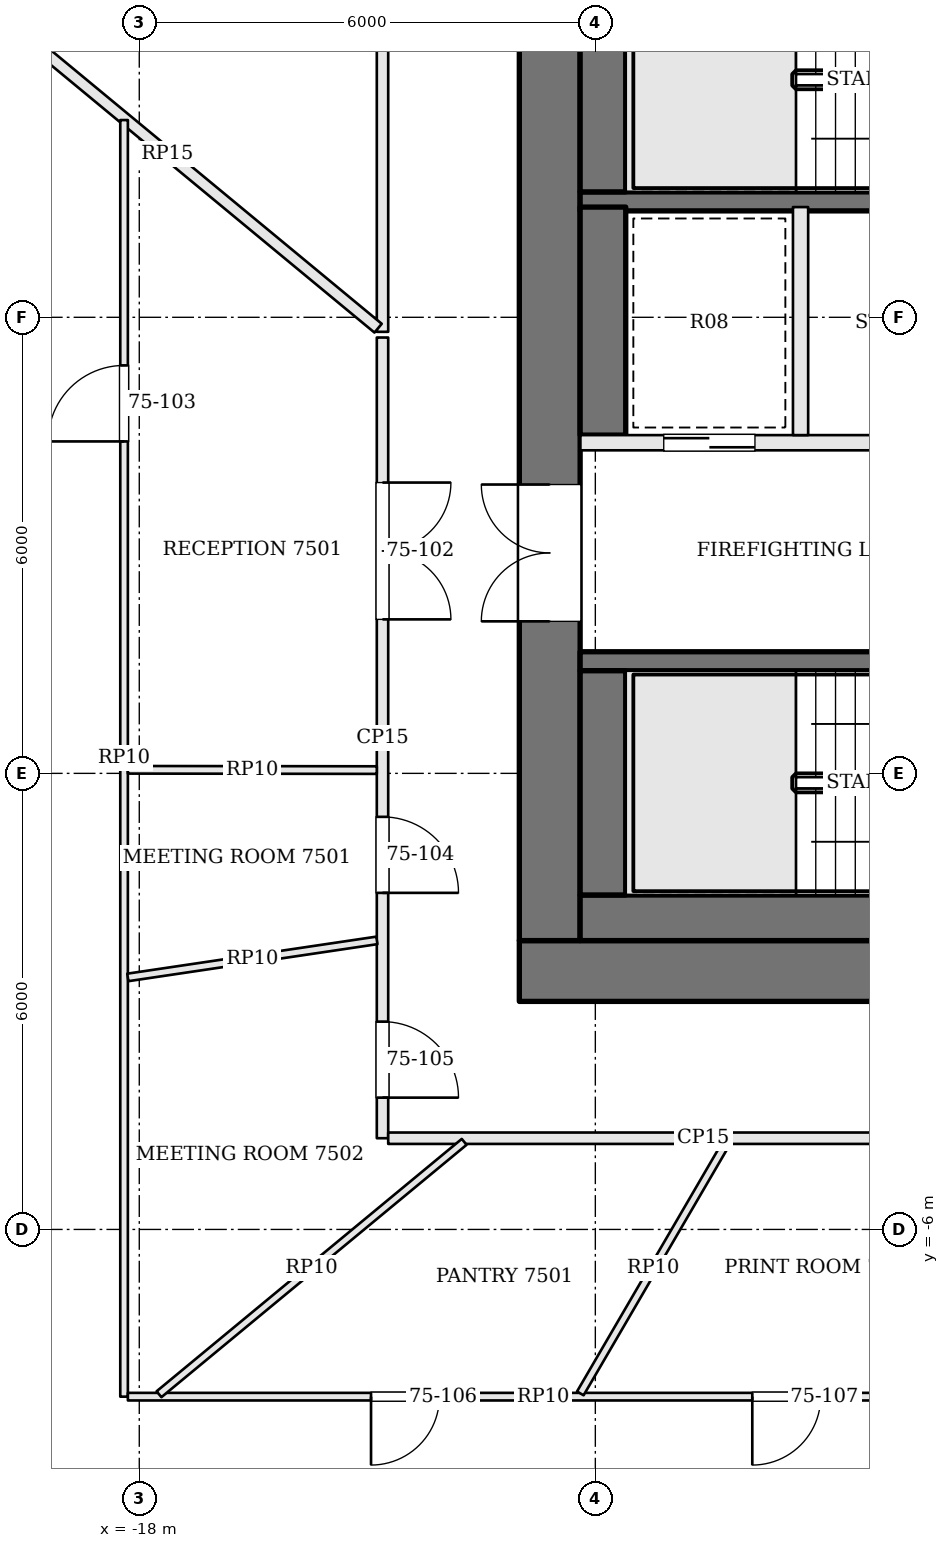
"""IFC4 building model, lengths in metres.
Left out: names, types, materials, properties, quantities, classifications, styles, units other than length and angle.
Written with IfcOpenShell. Run it as: python <this file> out.ifc"""

import sys

from ifc_helpers import new_model, si_unit, direction, frame, frame_2d, origin, place, context, subcontext, project, spatial, rectangle, extrude, element, fill, save


model = new_model("IFC4")
c1 = context("Model", 3, precision=1e-05, world=origin(), true_north=direction((0.0, 1.0)))
c2 = subcontext(c1, "Body", "Model", "MODEL_VIEW")
j1 = project(units=[si_unit("LENGTHUNIT", "METRE"), si_unit("PLANEANGLEUNIT", "RADIAN")], contexts=[c1])
p1 = place(None, origin())
s1 = spatial("IfcSite", under=j1, at=p1, CompositionType="ELEMENT")
p2 = place(p1, origin())
s2 = spatial("IfcBuilding", under=s1, at=p2, CompositionType="ELEMENT")
p3 = place(p2, frame((0.0, 0.0, 303.9)))
s3 = spatial("IfcBuildingStorey", under=s2, at=p3, CompositionType="ELEMENT", Elevation=303.9)
p4 = place(p3, frame((-13.0, -2.6, 0.0), z_axis=(0.0, 0.0, 1.0), x_axis=(1.0, 0.0, 0.0)))
e1 = element("IfcWall", 1, at=p4, inside=s3, PredefinedType="SHEAR", context=c2, shape_type="SweptSolid", body=[
    extrude(rectangle(XDim=26.0, YDim=0.8, at=frame_2d((13.0, 0.0))), origin(), (0.0, 0.0, 1.0), 3.9),
])
p5 = place(p4, frame((9.275, 0.0, 0.0)))
e2 = element("IfcOpeningElement", 2, at=p5, cuts=e1, PredefinedType="OPENING", context=c2, shape_type="SweptSolid", body=[
    extrude(rectangle(XDim=0.9, YDim=2.1, at=frame_2d((0.45, 1.05))), frame((0.0, 0.41, 0.0), z_axis=(0.0, -1.0, 0.0), x_axis=(1.0, 0.0, 0.0)), (0.0, 0.0, 1.0), 0.82),
])
p6 = place(p4, frame((11.75, 0.0, 0.0)))
e3 = element("IfcOpeningElement", 3, at=p6, cuts=e1, PredefinedType="OPENING", context=c2, shape_type="SweptSolid", body=[
    extrude(rectangle(XDim=1.0, YDim=2.1, at=frame_2d((0.5, 1.05))), frame((0.0, 0.41, 0.0), z_axis=(0.0, -1.0, 0.0), x_axis=(1.0, 0.0, 0.0)), (0.0, 0.0, 1.0), 0.82),
])
p7 = place(p4, frame((14.325, 0.0, 0.0)))
e4 = element("IfcOpeningElement", 4, at=p7, cuts=e1, PredefinedType="OPENING", context=c2, shape_type="SweptSolid", body=[
    extrude(rectangle(XDim=0.9, YDim=2.1, at=frame_2d((0.45, 1.05))), frame((0.0, 0.41, 0.0), z_axis=(0.0, -1.0, 0.0), x_axis=(1.0, 0.0, 0.0)), (0.0, 0.0, 1.0), 0.82),
])
p8 = place(p4, frame((16.7, 0.0, 0.0)))
e5 = element("IfcOpeningElement", 5, at=p8, cuts=e1, PredefinedType="OPENING", context=c2, shape_type="SweptSolid", body=[
    extrude(rectangle(XDim=0.9, YDim=2.1, at=frame_2d((0.45, 1.05))), frame((0.0, 0.41, 0.0), z_axis=(0.0, -1.0, 0.0), x_axis=(1.0, 0.0, 0.0)), (0.0, 0.0, 1.0), 0.82),
])
p9 = place(p3, frame((-12.6, -2.2, 0.0), z_axis=(0.0, 0.0, 1.0), x_axis=(0.0, 1.0, 0.0)))
e6 = element("IfcWall", 6, at=p9, inside=s3, PredefinedType="SHEAR", context=c2, shape_type="SweptSolid", body=[
    extrude(rectangle(XDim=13.4, YDim=0.8, at=frame_2d((6.7, 0.0))), origin(), (0.0, 0.0, 1.0), 3.9),
])
p10 = place(p9, frame((4.2, 0.0, 0.0)))
e7 = element("IfcOpeningElement", 7, at=p10, cuts=e6, PredefinedType="OPENING", context=c2, shape_type="SweptSolid", body=[
    extrude(rectangle(XDim=1.8, YDim=2.1, at=frame_2d((0.9, 1.05))), frame((0.0, 0.41, 0.0), z_axis=(0.0, -1.0, 0.0), x_axis=(1.0, 0.0, 0.0)), (0.0, 0.0, 1.0), 0.82),
])
p11 = place(p3, frame((-12.2, 1.475, 0.0), z_axis=(0.0, 0.0, 1.0), x_axis=(1.0, 0.0, 0.0)))
e8 = element("IfcWall", 8, at=p11, inside=s3, PredefinedType="SOLIDWALL", context=c2, shape_type="SweptSolid", body=[
    extrude(rectangle(XDim=7.1, YDim=0.25, at=frame_2d((3.55, 0.0))), origin(), (0.0, 0.0, 1.0), 3.7),
])
p12 = place(p11, frame((5.8, 0.0, 0.0)))
e9 = element("IfcOpeningElement", 9, at=p12, cuts=e8, PredefinedType="OPENING", context=c2, shape_type="SweptSolid", body=[
    extrude(rectangle(XDim=1.2, YDim=2.1, at=frame_2d((0.6, 1.05))), frame((0.0, 0.135, 0.0), z_axis=(0.0, -1.0, 0.0), x_axis=(1.0, 0.0, 0.0)), (0.0, 0.0, 1.0), 0.27),
])
p13 = place(p3, frame((-12.2, 4.35, 0.0), z_axis=(0.0, 0.0, 1.0), x_axis=(1.0, 0.0, 0.0)))
e10 = element("IfcWall", 10, at=p13, inside=s3, PredefinedType="SOLIDWALL", context=c2, shape_type="SweptSolid", body=[
    extrude(rectangle(XDim=7.1, YDim=0.2, at=frame_2d((3.55, 0.0))), origin(), (0.0, 0.0, 1.0), 3.7),
])
p14 = place(p13, frame((4.4, 0.0, 0.0)))
e11 = element("IfcOpeningElement", 11, at=p14, cuts=e10, PredefinedType="OPENING", context=c2, shape_type="SweptSolid", body=[
    extrude(rectangle(XDim=1.2, YDim=2.1, at=frame_2d((0.6, 1.05))), frame((0.0, 0.11, 0.0), z_axis=(0.0, -1.0, 0.0), x_axis=(1.0, 0.0, 0.0)), (0.0, 0.0, 1.0), 0.22),
])
p15 = place(p13, frame((1.1, 0.0, 0.0)))
e12 = element("IfcOpeningElement", 12, at=p15, cuts=e10, PredefinedType="OPENING", context=c2, shape_type="SweptSolid", body=[
    extrude(rectangle(XDim=1.2, YDim=2.1, at=frame_2d((0.6, 1.05))), frame((0.0, 0.11, 0.0), z_axis=(0.0, -1.0, 0.0), x_axis=(1.0, 0.0, 0.0)), (0.0, 0.0, 1.0), 0.22),
])
p16 = place(p3, frame((-12.2, 7.525, 0.0), z_axis=(0.0, 0.0, 1.0), x_axis=(1.0, 0.0, 0.0)))
e13 = element("IfcWall", 13, at=p16, inside=s3, PredefinedType="SOLIDWALL", context=c2, shape_type="SweptSolid", body=[
    extrude(rectangle(XDim=7.1, YDim=0.25, at=frame_2d((3.55, 0.0))), origin(), (0.0, 0.0, 1.0), 3.7),
])
p17 = place(p16, frame((5.8, 0.0, 0.0)))
e14 = element("IfcOpeningElement", 14, at=p17, cuts=e13, PredefinedType="OPENING", context=c2, shape_type="SweptSolid", body=[
    extrude(rectangle(XDim=1.2, YDim=2.1, at=frame_2d((0.6, 1.05))), frame((0.0, 0.135, 0.0), z_axis=(0.0, -1.0, 0.0), x_axis=(1.0, 0.0, 0.0)), (0.0, 0.0, 1.0), 0.27),
])
p18 = place(p3, frame((-9.3, 4.45, 0.0), z_axis=(0.0, 0.0, 1.0), x_axis=(0.0, 1.0, 0.0)))
e15 = element("IfcWall", 15, at=p18, inside=s3, PredefinedType="SOLIDWALL", context=c2, shape_type="SweptSolid", body=[
    extrude(rectangle(XDim=3.0, YDim=0.2, at=frame_2d((1.5, 0.0))), origin(), (0.0, 0.0, 1.0), 3.7),
])
p19 = place(p3, frame((-12.2, -1.9, 0.0), z_axis=(0.0, 0.0, 1.0), x_axis=(1.0, 0.0, 0.0)))
e16 = element("IfcWall", 16, at=p19, inside=s3, PredefinedType="SOLIDWALL", context=c2, shape_type="SweptSolid", body=[
    extrude(rectangle(XDim=7.1, YDim=0.6, at=frame_2d((3.55, 0.0))), origin(), (0.0, 0.0, 1.0), 3.7),
])
p20 = place(p3, frame((-11.9, -1.6, 0.0), z_axis=(0.0, 0.0, 1.0), x_axis=(0.0, 1.0, 0.0)))
e17 = element("IfcWall", 17, at=p20, inside=s3, PredefinedType="SOLIDWALL", context=c2, shape_type="SweptSolid", body=[
    extrude(rectangle(XDim=2.95, YDim=0.6, at=frame_2d((1.475, 0.0))), origin(), (0.0, 0.0, 1.0), 3.7),
])
p21 = place(p3, frame((-11.9, 4.45, 0.0), z_axis=(0.0, 0.0, 1.0), x_axis=(0.0, 1.0, 0.0)))
e18 = element("IfcWall", 18, at=p21, inside=s3, PredefinedType="SOLIDWALL", context=c2, shape_type="SweptSolid", body=[
    extrude(rectangle(XDim=3.0, YDim=0.6, at=frame_2d((1.5, 0.0))), origin(), (0.0, 0.0, 1.0), 3.7),
])
p22 = place(p3, frame((-11.9, 7.65, 0.0), z_axis=(0.0, 0.0, 1.0), x_axis=(0.0, 1.0, 0.0)))
e19 = element("IfcWall", 19, at=p22, inside=s3, PredefinedType="SOLIDWALL", context=c2, shape_type="SweptSolid", body=[
    extrude(rectangle(XDim=2.95, YDim=0.6, at=frame_2d((1.475, 0.0))), origin(), (0.0, 0.0, 1.0), 3.7),
])
p23 = place(p3, frame((-14.8, 13.725, 0.0), z_axis=(0.0, 0.0, 1.0), x_axis=(0.0, -1.0, 0.0)))
e20 = element("IfcWall", 20, at=p23, inside=s3, PredefinedType="PARTITIONING", context=c2, shape_type="SweptSolid", body=[
    extrude(rectangle(XDim=7.916, YDim=0.15, at=frame_2d((3.958, 0.0))), origin(), (0.0, 0.0, 1.0), 3.198),
])
p24 = place(p3, frame((-20.403, 10.442, 0.0), z_axis=(0.0, 0.0, 1.0), x_axis=(0.770599445655, -0.637319774019, 0.0)))
e21 = element("IfcWall", 21, at=p24, inside=s3, PredefinedType="PARTITIONING", context=c2, shape_type="SweptSolid", body=[
    extrude(rectangle(XDim=7.195, YDim=0.15, at=frame_2d((3.598, 0.0))), origin(), (0.0, 0.0, 1.0), 2.78),
])
p25 = place(p3, frame((-14.8, 5.734, 0.0), z_axis=(0.0, 0.0, 1.0), x_axis=(0.0, -1.0, 0.0)))
e22 = element("IfcWall", 22, at=p25, inside=s3, PredefinedType="PARTITIONING", context=c2, shape_type="SweptSolid", body=[
    extrude(rectangle(XDim=10.534, YDim=0.15, at=frame_2d((5.267, 0.0))), origin(), (0.0, 0.0, 1.0), 3.198),
])
p26 = place(p25, frame((1.908, 0.0, 0.0)))
e23 = element("IfcOpeningElement", 23, at=p26, cuts=e22, PredefinedType="OPENING", context=c2, shape_type="SweptSolid", body=[
    extrude(rectangle(XDim=1.8, YDim=2.1, at=frame_2d((0.9, 1.05))), frame((0.0, 0.085, 0.0), z_axis=(0.0, -1.0, 0.0), x_axis=(1.0, 0.0, 0.0)), (0.0, 0.0, 1.0), 0.17),
])
p27 = place(p25, frame((6.306, 0.0, 0.0)))
e24 = element("IfcOpeningElement", 24, at=p27, cuts=e22, PredefinedType="OPENING", context=c2, shape_type="SweptSolid", body=[
    extrude(rectangle(XDim=1.0, YDim=2.4, at=frame_2d((0.5, 1.2))), frame((0.0, 0.085, 0.0), z_axis=(0.0, -1.0, 0.0), x_axis=(1.0, 0.0, 0.0)), (0.0, 0.0, 1.0), 0.17),
])
p28 = place(p25, frame((9.0, 0.0, 0.0)))
e25 = element("IfcOpeningElement", 25, at=p28, cuts=e22, PredefinedType="OPENING", context=c2, shape_type="SweptSolid", body=[
    extrude(rectangle(XDim=1.0, YDim=2.4, at=frame_2d((0.5, 1.2))), frame((0.0, 0.085, 0.0), z_axis=(0.0, -1.0, 0.0), x_axis=(1.0, 0.0, 0.0)), (0.0, 0.0, 1.0), 0.17),
])
p29 = place(p3, frame((-14.725, -4.8, 0.0), z_axis=(0.0, 0.0, 1.0), x_axis=(1.0, 0.0, 0.0)))
e26 = element("IfcWall", 26, at=p29, inside=s3, PredefinedType="PARTITIONING", context=c2, shape_type="SweptSolid", body=[
    extrude(rectangle(XDim=8.288, YDim=0.15, at=frame_2d((4.144, 0.0))), origin(), (0.0, 0.0, 1.0), 3.198),
])
p30 = place(p3, frame((-9.286, -17.485, 0.0), z_axis=(0.0, 0.0, 1.0), x_axis=(0.219187693593, 0.975682712247, 0.0)))
e27 = element("IfcWall", 27, at=p30, inside=s3, PredefinedType="PARTITIONING", context=c2, shape_type="SweptSolid", body=[
    extrude(rectangle(XDim=12.926, YDim=0.15, at=frame_2d((6.463, 0.0))), origin(), (0.0, 0.0, 1.0), 2.78),
])
p31 = place(p3, frame((-18.2, -8.2, 0.0), z_axis=(0.0, 0.0, 1.0), x_axis=(0.0, 1.0, 0.0)))
e28 = element("IfcWall", 28, at=p31, inside=s3, PredefinedType="PARTITIONING", context=c2, shape_type="SweptSolid", body=[
    extrude(rectangle(XDim=16.795, YDim=0.1, at=frame_2d((8.397, 0.0))), origin(), (0.0, 0.0, 1.0), 3.198),
])
p32 = place(p31, frame((12.567, 0.0, 0.0)))
e29 = element("IfcOpeningElement", 29, at=p32, cuts=e28, PredefinedType="OPENING", context=c2, shape_type="SweptSolid", body=[
    extrude(rectangle(XDim=1.0, YDim=2.1, at=frame_2d((0.5, 1.05))), frame((0.0, 0.06, 0.0), z_axis=(0.0, -1.0, 0.0), x_axis=(1.0, 0.0, 0.0)), (0.0, 0.0, 1.0), 0.12),
])
p33 = place(p3, frame((-7.221, -8.2, 0.0), z_axis=(0.0, 0.0, 1.0), x_axis=(-1.0, 0.0, 0.0)))
e30 = element("IfcWall", 30, at=p33, inside=s3, PredefinedType="PARTITIONING", context=c2, shape_type="SweptSolid", body=[
    extrude(rectangle(XDim=10.929, YDim=0.1, at=frame_2d((5.464, 0.0))), origin(), (0.0, 0.0, 1.0), 3.198),
])
p34 = place(p33, frame((6.83, 0.0, 0.0)))
e31 = element("IfcOpeningElement", 31, at=p34, cuts=e30, PredefinedType="OPENING", context=c2, shape_type="SweptSolid", body=[
    extrude(rectangle(XDim=0.9, YDim=2.1, at=frame_2d((0.45, 1.05))), frame((0.0, 0.06, 0.0), z_axis=(0.0, -1.0, 0.0), x_axis=(1.0, 0.0, 0.0)), (0.0, 0.0, 1.0), 0.12),
])
p35 = place(p33, frame((1.814, 0.0, 0.0)))
e32 = element("IfcOpeningElement", 32, at=p35, cuts=e30, PredefinedType="OPENING", context=c2, shape_type="SweptSolid", body=[
    extrude(rectangle(XDim=0.9, YDim=2.1, at=frame_2d((0.45, 1.05))), frame((0.0, 0.06, 0.0), z_axis=(0.0, -1.0, 0.0), x_axis=(1.0, 0.0, 0.0)), (0.0, 0.0, 1.0), 0.12),
])
p36 = place(p3, frame((-14.875, 0.043, 0.0), z_axis=(0.0, 0.0, 1.0), x_axis=(-0.999999288634, 0.00119278281, 0.0)))
e33 = element("IfcWall", 33, at=p36, inside=s3, PredefinedType="PARTITIONING", context=c2, shape_type="SweptSolid", body=[
    extrude(rectangle(XDim=3.275, YDim=0.1, at=frame_2d((1.637, 0.0))), origin(), (0.0, 0.0, 1.0), 3.198),
])
p37 = place(p3, frame((-14.874, -2.198, 0.0), z_axis=(0.0, 0.0, 1.0), x_axis=(-0.989128534105, -0.147053537934, 0.0)))
e34 = element("IfcWall", 34, at=p37, inside=s3, PredefinedType="PARTITIONING", context=c2, shape_type="SweptSolid", body=[
    extrude(rectangle(XDim=3.312, YDim=0.1, at=frame_2d((1.656, 0.0))), origin(), (0.0, 0.0, 1.0), 3.198),
])
p38 = place(p3, frame((-13.726, -4.848, 0.0), z_axis=(0.0, 0.0, 1.0), x_axis=(-0.770616504922, -0.637299146667, 0.0)))
e35 = element("IfcWall", 35, at=p38, inside=s3, PredefinedType="PARTITIONING", context=c2, shape_type="SweptSolid", body=[
    extrude(rectangle(XDim=5.21, YDim=0.1, at=frame_2d((2.605, 0.0))), origin(), (0.0, 0.0, 1.0), 3.198),
])
p39 = place(p3, frame((-10.278, -4.865, 0.0), z_axis=(0.0, 0.0, 1.0), x_axis=(-0.503743553808, -0.863853246794, 0.0)))
e36 = element("IfcWall", 36, at=p39, inside=s3, PredefinedType="PARTITIONING", context=c2, shape_type="SweptSolid", body=[
    extrude(rectangle(XDim=3.811, YDim=0.1, at=frame_2d((1.905, 0.0))), origin(), (0.0, 0.0, 1.0), 3.198),
])
p40 = place(p10, origin())
e37 = element("IfcDoor", 37, at=p40, inside=s3, OperationType="DOUBLE_DOOR_SINGLE_SWING", PredefinedType="DOOR", context=c2, shape_type="SweptSolid", body=[
    extrude(rectangle(XDim=1.8, YDim=2.1, at=frame_2d((0.9, 1.05))), frame((0.0, 0.025, 0.0), z_axis=(0.0, -1.0, 0.0), x_axis=(1.0, 0.0, 0.0)), (0.0, 0.0, 1.0), 0.05),
])
fill(e7, e37)
p41 = place(p15, origin())
e38 = element("IfcDoor", 38, at=p41, inside=s3, OperationType="SLIDING_TO_RIGHT", PredefinedType="DOOR", context=c2, shape_type="SweptSolid", body=[
    extrude(rectangle(XDim=1.2, YDim=2.1, at=frame_2d((0.6, 1.05))), frame((0.0, 0.025, 0.0), z_axis=(0.0, -1.0, 0.0), x_axis=(1.0, 0.0, 0.0)), (0.0, 0.0, 1.0), 0.05),
])
fill(e12, e38)
p42 = place(p26, origin())
e39 = element("IfcDoor", 39, at=p42, inside=s3, OperationType="DOUBLE_DOOR_SINGLE_SWING", PredefinedType="DOOR", context=c2, shape_type="SweptSolid", body=[
    extrude(rectangle(XDim=1.8, YDim=2.1, at=frame_2d((0.9, 1.05))), frame((0.0, 0.025, 0.0), z_axis=(0.0, -1.0, 0.0), x_axis=(1.0, 0.0, 0.0)), (0.0, 0.0, 1.0), 0.05),
])
fill(e23, e39)
p43 = place(p32, origin())
e40 = element("IfcDoor", 40, at=p43, inside=s3, OperationType="SINGLE_SWING_LEFT", PredefinedType="DOOR", context=c2, shape_type="SweptSolid", body=[
    extrude(rectangle(XDim=1.0, YDim=2.1, at=frame_2d((0.5, 1.05))), frame((0.0, 0.025, 0.0), z_axis=(0.0, -1.0, 0.0), x_axis=(1.0, 0.0, 0.0)), (0.0, 0.0, 1.0), 0.05),
])
fill(e29, e40)
p44 = place(p27, origin())
e41 = element("IfcDoor", 41, at=p44, inside=s3, OperationType="SINGLE_SWING_RIGHT", PredefinedType="DOOR", context=c2, shape_type="SweptSolid", body=[
    extrude(rectangle(XDim=1.0, YDim=2.4, at=frame_2d((0.5, 1.2))), frame((0.0, 0.025, 0.0), z_axis=(0.0, -1.0, 0.0), x_axis=(1.0, 0.0, 0.0)), (0.0, 0.0, 1.0), 0.05),
])
fill(e24, e41)
p45 = place(p28, origin())
e42 = element("IfcDoor", 42, at=p45, inside=s3, OperationType="SINGLE_SWING_RIGHT", PredefinedType="DOOR", context=c2, shape_type="SweptSolid", body=[
    extrude(rectangle(XDim=1.0, YDim=2.4, at=frame_2d((0.5, 1.2))), frame((0.0, 0.025, 0.0), z_axis=(0.0, -1.0, 0.0), x_axis=(1.0, 0.0, 0.0)), (0.0, 0.0, 1.0), 0.05),
])
fill(e25, e42)
p46 = place(p34, origin())
e43 = element("IfcDoor", 43, at=p46, inside=s3, OperationType="SINGLE_SWING_RIGHT", PredefinedType="DOOR", context=c2, shape_type="SweptSolid", body=[
    extrude(rectangle(XDim=0.9, YDim=2.1, at=frame_2d((0.45, 1.05))), frame((0.0, 0.025, 0.0), z_axis=(0.0, -1.0, 0.0), x_axis=(1.0, 0.0, 0.0)), (0.0, 0.0, 1.0), 0.05),
])
fill(e31, e43)
p47 = place(p35, origin())
e44 = element("IfcDoor", 44, at=p47, inside=s3, OperationType="SINGLE_SWING_RIGHT", PredefinedType="DOOR", context=c2, shape_type="SweptSolid", body=[
    extrude(rectangle(XDim=0.9, YDim=2.1, at=frame_2d((0.45, 1.05))), frame((0.0, 0.025, 0.0), z_axis=(0.0, -1.0, 0.0), x_axis=(1.0, 0.0, 0.0)), (0.0, 0.0, 1.0), 0.05),
])
fill(e32, e44)
save(model, sys.argv[1])
